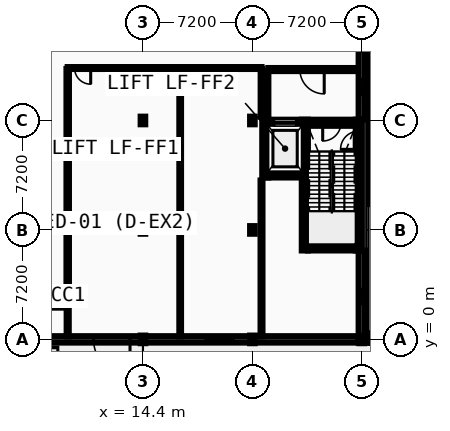
"""IFC4 building model, lengths in metres.
Left out: names, types, materials, properties, quantities, classifications, styles, units other than length and angle.
Written with IfcOpenShell. Run it as: python <this file> out.ifc"""

import sys

from ifc_helpers import new_model, si_unit, direction, frame, frame_2d, origin, origin_2d, place, context, subcontext, project, spatial, rectangle, i_section, extrude, element, fill, save


model = new_model("IFC4")
c1 = context("Model", 3, precision=1e-05, world=origin(), true_north=direction((0.0, 1.0)))
c2 = subcontext(c1, "Body", "Model", "MODEL_VIEW")
j1 = project(units=[si_unit("LENGTHUNIT", "METRE"), si_unit("PLANEANGLEUNIT", "RADIAN")], contexts=[c1])
p1 = place(None, origin())
s1 = spatial("IfcSite", under=j1, at=p1, CompositionType="ELEMENT")
p2 = place(p1, origin())
s2 = spatial("IfcBuilding", under=s1, at=p2, CompositionType="ELEMENT")
p3 = place(p2, origin())
s3 = spatial("IfcBuildingStorey", under=s2, at=p3, CompositionType="ELEMENT", Elevation=0.0)
for number, where, z_axis, x_axis in (
    (1, (14.4, 0.0, 0.0), (0.0, 0.0, 1.0), (1.0, 0.0, 0.0)),
    (2, (14.4, 7.2, 0.0), (0.0, 0.0, 1.0), (1.0, 0.0, 0.0)),
    (3, (14.4, 14.4, 0.0), (0.0, 0.0, 1.0), (1.0, 0.0, 0.0)),
    (4, (21.6, 0.0, 0.0), (0.0, 0.0, 1.0), (1.0, 0.0, 0.0)),
    (5, (21.6, 7.2, 0.0), (0.0, 0.0, 1.0), (1.0, 0.0, 0.0)),
    (6, (21.6, 14.4, 0.0), (0.0, 0.0, 1.0), (1.0, 0.0, 0.0)),
    (7, (28.8, 0.0, 0.0), (0.0, 0.0, 1.0), (1.0, 0.0, 0.0)),
):
    element("IfcColumn", number, at=place(p3, frame(where, z_axis=z_axis, x_axis=x_axis)), inside=s3, PredefinedType="COLUMN", context=c2, shape_type="SweptSolid", body=[
        extrude(i_section(OverallWidth=0.3, OverallDepth=0.5, WebThickness=0.014, FlangeThickness=0.028, FilletRadius=0.027, at=origin_2d()), origin(), (0.0, 0.0, 1.0), 5.2),
    ])
for number, where, z_axis, x_axis in (
    (8, (29.52, 0.0, 0.0), (0.0, 0.0, 1.0), (1.0, 0.0, 0.0)),
    (9, (29.52, 14.4, 0.0), (0.0, 0.0, 1.0), (1.0, 0.0, 0.0)),
):
    element("IfcColumn", number, at=place(p3, frame(where, z_axis=z_axis, x_axis=x_axis)), inside=s3, PredefinedType="COLUMN", context=c2, shape_type="SweptSolid", body=[
        extrude(i_section(OverallWidth=0.3, OverallDepth=0.45, WebThickness=0.014, FlangeThickness=0.026, FilletRadius=0.027, at=origin_2d()), origin(), (0.0, 0.0, 1.0), 5.2),
    ])
p4 = place(p3, frame((7.2, 0.0, 0.0), z_axis=(0.0, 0.0, 1.0), x_axis=(1.0, 0.0, 0.0)))
e10 = element("IfcWall", 10, at=p4, inside=s3, PredefinedType="STANDARD", context=c2, shape_type="SweptSolid", body=[
    extrude(rectangle(XDim=7.2, YDim=0.42, at=frame_2d((3.6, 0.0))), origin(), (0.0, 0.0, 1.0), 4.665),
])
p5 = place(p4, frame((3.95, 0.0, 0.0)))
e11 = element("IfcOpeningElement", 11, at=p5, cuts=e10, PredefinedType="OPENING", context=c2, shape_type="SweptSolid", body=[
    extrude(rectangle(XDim=2.4, YDim=2.5, at=frame_2d((1.2, 1.25))), frame((0.0, 0.22, 0.0), z_axis=(0.0, -1.0, 0.0), x_axis=(1.0, 0.0, 0.0)), (0.0, 0.0, 1.0), 0.44),
])
p6 = place(p3, frame((14.4, 0.0, 0.0), z_axis=(0.0, 0.0, 1.0), x_axis=(1.0, 0.0, 0.0)))
e12 = element("IfcWall", 12, at=p6, inside=s3, PredefinedType="STANDARD", context=c2, shape_type="SweptSolid", body=[
    extrude(rectangle(XDim=7.2, YDim=0.42, at=frame_2d((3.6, 0.0))), origin(), (0.0, 0.0, 1.0), 4.665),
])
p7 = place(p6, frame((4.14, 0.0, 0.9)))
e13 = element("IfcOpeningElement", 13, at=p7, cuts=e12, PredefinedType="OPENING", context=c2, shape_type="SweptSolid", body=[
    extrude(rectangle(XDim=1.8, YDim=1.8, at=frame_2d((0.9, 0.9))), frame((0.0, 0.22, 0.0), z_axis=(0.0, -1.0, 0.0), x_axis=(1.0, 0.0, 0.0)), (0.0, 0.0, 1.0), 0.44),
])
p8 = place(p3, frame((21.6, 0.0, 0.0), z_axis=(0.0, 0.0, 1.0), x_axis=(1.0, 0.0, 0.0)))
e14 = element("IfcWall", 14, at=p8, inside=s3, PredefinedType="STANDARD", context=c2, shape_type="SweptSolid", body=[
    extrude(rectangle(XDim=6.99, YDim=0.42, at=frame_2d((3.495, 0.0))), origin(), (0.0, 0.0, 1.0), 4.665),
])
p9 = place(p3, frame((28.8, -0.21, 0.0), z_axis=(0.0, 0.0, 1.0), x_axis=(0.0, 1.0, 0.0)))
e15 = element("IfcWall", 15, at=p9, inside=s3, PredefinedType="STANDARD", context=c2, shape_type="SweptSolid", body=[
    extrude(rectangle(XDim=6.06, YDim=0.42, at=frame_2d((3.03, 0.0))), origin(), (0.0, 0.0, 1.0), 4.97),
])
p10 = place(p9, frame((2.549, 0.0, 0.95)))
e16 = element("IfcOpeningElement", 16, at=p10, cuts=e15, PredefinedType="OPENING", context=c2, shape_type="SweptSolid", body=[
    extrude(rectangle(XDim=0.962, YDim=1.26, at=frame_2d((0.481, 0.63))), frame((0.0, 0.22, 0.0), z_axis=(0.0, -1.0, 0.0), x_axis=(1.0, 0.0, 0.0)), (0.0, 0.0, 1.0), 0.44),
])
p11 = place(p3, frame((28.8, 14.45, 0.0), z_axis=(0.0, 0.0, 1.0), x_axis=(0.0, 1.0, 0.0)))
e17 = element("IfcWall", 17, at=p11, inside=s3, PredefinedType="STANDARD", context=c2, shape_type="SweptSolid", body=[
    extrude(rectangle(XDim=7.15, YDim=0.42, at=frame_2d((3.575, 0.0))), origin(), (0.0, 0.0, 1.0), 4.97),
])
p12 = place(p11, frame((1.647, 0.0, 0.95)))
e18 = element("IfcOpeningElement", 18, at=p12, cuts=e17, PredefinedType="OPENING", context=c2, shape_type="SweptSolid", body=[
    extrude(rectangle(XDim=0.996, YDim=1.26, at=frame_2d((0.498, 0.63))), frame((0.0, 0.22, 0.0), z_axis=(0.0, -1.0, 0.0), x_axis=(1.0, 0.0, 0.0)), (0.0, 0.0, 1.0), 0.44),
])
p13 = place(p11, frame((4.507, 0.0, 0.95)))
e19 = element("IfcOpeningElement", 19, at=p13, cuts=e17, PredefinedType="OPENING", context=c2, shape_type="SweptSolid", body=[
    extrude(rectangle(XDim=0.996, YDim=1.26, at=frame_2d((0.498, 0.63))), frame((0.0, 0.22, 0.0), z_axis=(0.0, -1.0, 0.0), x_axis=(1.0, 0.0, 0.0)), (0.0, 0.0, 1.0), 0.44),
])
p14 = place(p3, frame((29.52, 0.4, 0.0), z_axis=(0.0, 0.0, 1.0), x_axis=(0.0, -1.0, 0.0)))
e20 = element("IfcWall", 20, at=p14, inside=s3, PredefinedType="STANDARD", context=c2, shape_type="SweptSolid", body=[
    extrude(rectangle(XDim=0.61, YDim=0.42, at=frame_2d((0.305, 0.0))), origin(), (0.0, 0.0, 1.0), 4.97),
])
p15 = place(p3, frame((29.52, 14.4, 0.0), z_axis=(0.0, 0.0, 1.0), x_axis=(0.0, -1.0, 0.0)))
e21 = element("IfcWall", 21, at=p15, inside=s3, PredefinedType="STANDARD", context=c2, shape_type="SweptSolid", body=[
    extrude(rectangle(XDim=5.5, YDim=0.42, at=frame_2d((2.75, 0.0))), origin(), (0.0, 0.0, 1.0), 4.97),
])
p16 = place(p3, frame((29.52, 21.6, 0.0), z_axis=(0.0, 0.0, 1.0), x_axis=(0.0, -1.0, 0.0)))
e22 = element("IfcWall", 22, at=p16, inside=s3, PredefinedType="STANDARD", context=c2, shape_type="SweptSolid", body=[
    extrude(rectangle(XDim=7.2, YDim=0.42, at=frame_2d((3.6, 0.0))), origin(), (0.0, 0.0, 1.0), 4.665),
])
p17 = place(p16, frame((1.628, 0.0, 0.95)))
e23 = element("IfcOpeningElement", 23, at=p17, cuts=e22, PredefinedType="OPENING", context=c2, shape_type="SweptSolid", body=[
    extrude(rectangle(XDim=1.064, YDim=1.296, at=frame_2d((0.532, 0.648))), frame((0.0, 0.22, 0.0), z_axis=(0.0, -1.0, 0.0), x_axis=(1.0, 0.0, 0.0)), (0.0, 0.0, 1.0), 0.44),
])
p18 = place(p16, frame((4.508, 0.0, 0.95)))
e24 = element("IfcOpeningElement", 24, at=p18, cuts=e22, PredefinedType="OPENING", context=c2, shape_type="SweptSolid", body=[
    extrude(rectangle(XDim=1.064, YDim=1.296, at=frame_2d((0.532, 0.648))), frame((0.0, 0.22, 0.0), z_axis=(0.0, -1.0, 0.0), x_axis=(1.0, 0.0, 0.0)), (0.0, 0.0, 1.0), 0.44),
])
p19 = place(p3, frame((25.25, 6.05, 0.0), z_axis=(0.0, 0.0, 1.0), x_axis=(1.0, 0.0, 0.0)))
e25 = element("IfcWall", 25, at=p19, inside=s3, PredefinedType="SHEAR", context=c2, shape_type="SweptSolid", body=[
    extrude(rectangle(XDim=3.15, YDim=0.4, at=frame_2d((1.575, 0.0))), origin(), (0.0, 0.0, 1.0), 4.97),
])
p20 = place(p3, frame((25.25, 14.25, 0.0), z_axis=(0.0, 0.0, 1.0), x_axis=(1.0, 0.0, 0.0)))
e26 = element("IfcWall", 26, at=p20, inside=s3, PredefinedType="SHEAR", context=c2, shape_type="SweptSolid", body=[
    extrude(rectangle(XDim=3.15, YDim=0.4, at=frame_2d((1.575, 0.0))), origin(), (0.0, 0.0, 1.0), 4.97),
])
p21 = place(p20, frame((0.975, 0.0, 0.0)))
e27 = element("IfcOpeningElement", 27, at=p21, cuts=e26, PredefinedType="OPENING", context=c2, shape_type="SweptSolid", body=[
    extrude(rectangle(XDim=1.2, YDim=2.15, at=frame_2d((0.6, 1.075))), frame((0.0, 0.21, 0.0), z_axis=(0.0, -1.0, 0.0), x_axis=(1.0, 0.0, 0.0)), (0.0, 0.0, 1.0), 0.42),
])
p22 = place(p3, frame((25.05, 5.85, 0.0), z_axis=(0.0, 0.0, 1.0), x_axis=(0.0, 1.0, 0.0)))
e28 = element("IfcWall", 28, at=p22, inside=s3, PredefinedType="SHEAR", context=c2, shape_type="SweptSolid", body=[
    extrude(rectangle(XDim=8.6, YDim=0.4, at=frame_2d((4.3, 0.0))), origin(), (0.0, 0.0, 1.0), 4.97),
])
p23 = place(p3, frame((28.6, 5.85, 0.0), z_axis=(0.0, 0.0, 1.0), x_axis=(0.0, 1.0, 0.0)))
e29 = element("IfcWall", 29, at=p23, inside=s3, PredefinedType="SHEAR", context=c2, shape_type="SweptSolid", body=[
    extrude(rectangle(XDim=8.6, YDim=0.4, at=frame_2d((4.3, 0.0))), origin(), (0.0, 0.0, 1.0), 4.97),
])
p24 = place(p23, frame((6.65, 0.0, 0.0)))
e30 = element("IfcOpeningElement", 30, at=p24, cuts=e29, PredefinedType="OPENING", context=c2, shape_type="SweptSolid", body=[
    extrude(rectangle(XDim=1.2, YDim=2.15, at=frame_2d((0.6, 1.075))), frame((0.0, 0.21, 0.0), z_axis=(0.0, -1.0, 0.0), x_axis=(1.0, 0.0, 0.0)), (0.0, 0.0, 1.0), 0.42),
])
p25 = place(p3, frame((22.65, 10.85, 0.0), z_axis=(0.0, 0.0, 1.0), x_axis=(1.0, 0.0, 0.0)))
e31 = element("IfcWall", 31, at=p25, inside=s3, PredefinedType="SHEAR", context=c2, shape_type="SweptSolid", body=[
    extrude(rectangle(XDim=2.2, YDim=0.4, at=frame_2d((1.1, 0.0))), origin(), (0.0, 0.0, 1.0), 4.97),
])
p26 = place(p3, frame((22.65, 14.25, 0.0), z_axis=(0.0, 0.0, 1.0), x_axis=(1.0, 0.0, 0.0)))
e32 = element("IfcWall", 32, at=p26, inside=s3, PredefinedType="SHEAR", context=c2, shape_type="SweptSolid", body=[
    extrude(rectangle(XDim=2.2, YDim=0.4, at=frame_2d((1.1, 0.0))), origin(), (0.0, 0.0, 1.0), 4.97),
])
p27 = place(p26, frame((0.4, 0.0, 0.0)))
e33 = element("IfcOpeningElement", 33, at=p27, cuts=e32, PredefinedType="OPENING", context=c2, shape_type="SweptSolid", body=[
    extrude(rectangle(XDim=1.4, YDim=2.2, at=frame_2d((0.7, 1.1))), frame((0.0, 0.21, 0.0), z_axis=(0.0, -1.0, 0.0), x_axis=(1.0, 0.0, 0.0)), (0.0, 0.0, 1.0), 0.42),
])
p28 = place(p3, frame((22.45, 10.65, 0.0), z_axis=(0.0, 0.0, 1.0), x_axis=(0.0, 1.0, 0.0)))
e34 = element("IfcWall", 34, at=p28, inside=s3, PredefinedType="SHEAR", context=c2, shape_type="SweptSolid", body=[
    extrude(rectangle(XDim=3.8, YDim=0.4, at=frame_2d((1.9, 0.0))), origin(), (0.0, 0.0, 1.0), 4.97),
])
p29 = place(p3, frame((22.65, 17.75, 0.0), z_axis=(0.0, 0.0, 1.0), x_axis=(1.0, 0.0, 0.0)))
e35 = element("IfcWall", 35, at=p29, inside=s3, PredefinedType="PARTITIONING", context=c2, shape_type="SweptSolid", body=[
    extrude(rectangle(XDim=5.75, YDim=0.2, at=frame_2d((2.875, 0.0))), origin(), (0.0, 0.0, 1.0), 4.97),
])
p30 = place(p29, frame((2.075, 0.0, 0.0)))
e36 = element("IfcOpeningElement", 36, at=p30, cuts=e35, PredefinedType="OPENING", context=c2, shape_type="SweptSolid", body=[
    extrude(rectangle(XDim=1.6, YDim=2.2, at=frame_2d((0.8, 1.1))), frame((0.0, 0.11, 0.0), z_axis=(0.0, -1.0, 0.0), x_axis=(1.0, 0.0, 0.0)), (0.0, 0.0, 1.0), 0.22),
])
p31 = place(p3, frame((22.55, 14.45, 0.0), z_axis=(0.0, 0.0, 1.0), x_axis=(0.0, 1.0, 0.0)))
e37 = element("IfcWall", 37, at=p31, inside=s3, PredefinedType="PARTITIONING", context=c2, shape_type="SweptSolid", body=[
    extrude(rectangle(XDim=3.2, YDim=0.2, at=frame_2d((1.6, 0.0))), origin(), (0.0, 0.0, 1.0), 4.97),
])
for number, where, z_axis, x_axis in (
    (38, (8.09, 2.145, 0.0), (0.0, 0.0, 1.0), (1.0, 0.0, 0.0)),
    (39, (8.09, 3.305, 0.0), (0.0, 0.0, 1.0), (1.0, 0.0, 0.0)),
):
    element("IfcWall", number, at=place(p3, frame(where, z_axis=z_axis, x_axis=x_axis)), inside=s3, PredefinedType="PARTITIONING", context=c2, shape_type="SweptSolid", body=[
        extrude(rectangle(XDim=1.27, YDim=0.11, at=frame_2d((0.635, 0.0))), origin(), (0.0, 0.0, 1.0), 4.97),
    ])
p32 = place(p3, frame((9.305, 2.2, 0.0), z_axis=(0.0, 0.0, 1.0), x_axis=(0.0, 1.0, 0.0)))
e40 = element("IfcWall", 40, at=p32, inside=s3, PredefinedType="PARTITIONING", context=c2, shape_type="SweptSolid", body=[
    extrude(rectangle(XDim=1.05, YDim=0.11, at=frame_2d((0.525, 0.0))), origin(), (0.0, 0.0, 1.0), 4.97),
])
p33 = place(p3, frame((9.45, 17.85, 0.0), z_axis=(0.0, 0.0, 1.0), x_axis=(1.0, 0.0, 0.0)))
e41 = element("IfcWall", 41, at=p33, inside=s3, PredefinedType="PARTITIONING", context=c2, shape_type="SweptSolid", body=[
    extrude(rectangle(XDim=12.75, YDim=0.125, at=frame_2d((6.375, 0.0))), origin(), (0.0, 0.0, 1.0), 4.97),
])
p34 = place(p33, frame((7.85, 0.0, 0.0)))
e42 = element("IfcOpeningElement", 42, at=p34, cuts=e41, PredefinedType="OPENING", context=c2, shape_type="SweptSolid", body=[
    extrude(rectangle(XDim=1.0, YDim=2.1, at=frame_2d((0.5, 1.05))), frame((0.0, 0.073, 0.0), z_axis=(0.0, -1.0, 0.0), x_axis=(1.0, 0.0, 0.0)), (0.0, 0.0, 1.0), 0.145),
])
p35 = place(p33, frame((0.45, 0.0, 0.0)))
e43 = element("IfcOpeningElement", 43, at=p35, cuts=e41, PredefinedType="OPENING", context=c2, shape_type="SweptSolid", body=[
    extrude(rectangle(XDim=1.062, YDim=2.068, at=frame_2d((0.531, 1.034))), frame((0.0, 0.073, 0.0), z_axis=(0.0, -1.0, 0.0), x_axis=(1.0, 0.0, 0.0)), (0.0, 0.0, 1.0), 0.145),
])
p36 = place(p3, frame((9.45, 0.2, 0.0), z_axis=(0.0, 0.0, 1.0), x_axis=(0.0, 1.0, 0.0)))
e44 = element("IfcWall", 44, at=p36, inside=s3, PredefinedType="PARTITIONING", context=c2, shape_type="SweptSolid", body=[
    extrude(rectangle(XDim=1.89, YDim=0.135, at=frame_2d((0.945, 0.0))), origin(), (0.0, 0.0, 1.0), 4.655),
])
p37 = place(p3, frame((9.45, 3.36, 0.0), z_axis=(0.0, 0.0, 1.0), x_axis=(0.0, 1.0, 0.0)))
e45 = element("IfcWall", 45, at=p37, inside=s3, PredefinedType="PARTITIONING", context=c2, shape_type="SweptSolid", body=[
    extrude(rectangle(XDim=14.427, YDim=0.16, at=frame_2d((7.214, 0.0))), origin(), (0.0, 0.0, 1.0), 4.655),
])
p38 = place(p3, frame((16.85, 0.2, 0.0), z_axis=(0.0, 0.0, 1.0), x_axis=(0.0, 1.0, 0.0)))
e46 = element("IfcWall", 46, at=p38, inside=s3, PredefinedType="PARTITIONING", context=c2, shape_type="SweptSolid", body=[
    extrude(rectangle(XDim=17.588, YDim=0.11, at=frame_2d((8.794, 0.0))), origin(), (0.0, 0.0, 1.0), 4.655),
])
p39 = place(p3, frame((22.2, 0.2, 0.0), z_axis=(0.0, 0.0, 1.0), x_axis=(0.0, 1.0, 0.0)))
e47 = element("IfcWall", 47, at=p39, inside=s3, PredefinedType="PARTITIONING", context=c2, shape_type="SweptSolid", body=[
    extrude(rectangle(XDim=10.25, YDim=0.125, at=frame_2d((5.125, 0.0))), origin(), (0.0, 0.0, 1.0), 4.97),
])
p40 = place(p3, frame((22.2, 14.65, 0.0), z_axis=(0.0, 0.0, 1.0), x_axis=(0.0, 1.0, 0.0)))
e48 = element("IfcWall", 48, at=p40, inside=s3, PredefinedType="PARTITIONING", context=c2, shape_type="SweptSolid", body=[
    extrude(rectangle(XDim=3.138, YDim=0.11, at=frame_2d((1.569, 0.0))), origin(), (0.0, 0.0, 1.0), 4.97),
])
p41 = place(p7, origin())
e49 = element("IfcWindow", 49, at=p41, inside=s3, PartitioningType="SINGLE_PANEL", PredefinedType="WINDOW", context=c2, shape_type="SweptSolid", body=[
    extrude(rectangle(XDim=1.8, YDim=1.8, at=frame_2d((0.9, 0.9))), frame((0.0, 0.03, 0.0), z_axis=(0.0, -1.0, 0.0), x_axis=(1.0, 0.0, 0.0)), (0.0, 0.0, 1.0), 0.06),
])
fill(e13, e49)
p42 = place(p10, origin())
e50 = element("IfcWindow", 50, at=p42, inside=s3, PartitioningType="SINGLE_PANEL", PredefinedType="WINDOW", context=c2, shape_type="SweptSolid", body=[
    extrude(rectangle(XDim=0.962, YDim=1.26, at=frame_2d((0.481, 0.63))), frame((0.0, 0.03, 0.0), z_axis=(0.0, -1.0, 0.0), x_axis=(1.0, 0.0, 0.0)), (0.0, 0.0, 1.0), 0.06),
])
fill(e16, e50)
p43 = place(p12, origin())
e51 = element("IfcWindow", 51, at=p43, inside=s3, PartitioningType="SINGLE_PANEL", PredefinedType="WINDOW", context=c2, shape_type="SweptSolid", body=[
    extrude(rectangle(XDim=0.996, YDim=1.26, at=frame_2d((0.498, 0.63))), frame((0.0, 0.03, 0.0), z_axis=(0.0, -1.0, 0.0), x_axis=(1.0, 0.0, 0.0)), (0.0, 0.0, 1.0), 0.06),
])
fill(e18, e51)
p44 = place(p5, origin())
e52 = element("IfcDoor", 52, at=p44, inside=s3, OperationType="DOUBLE_DOOR_SINGLE_SWING", PredefinedType="DOOR", context=c2, shape_type="SweptSolid", body=[
    extrude(rectangle(XDim=2.4, YDim=2.5, at=frame_2d((1.2, 1.25))), frame((0.0, 0.025, 0.0), z_axis=(0.0, -1.0, 0.0), x_axis=(1.0, 0.0, 0.0)), (0.0, 0.0, 1.0), 0.05),
])
fill(e11, e52)
p45 = place(p21, frame((1.2, 0.0, 0.0), z_axis=(0.0, 0.0, 1.0), x_axis=(-1.0, 0.0, 0.0)))
e53 = element("IfcDoor", 53, at=p45, inside=s3, OperationType="SINGLE_SWING_LEFT", PredefinedType="DOOR", context=c2, shape_type="SweptSolid", body=[
    extrude(rectangle(XDim=1.2, YDim=2.15, at=frame_2d((0.6, 1.075))), frame((0.0, 0.025, 0.0), z_axis=(0.0, -1.0, 0.0), x_axis=(1.0, 0.0, 0.0)), (0.0, 0.0, 1.0), 0.05),
])
fill(e27, e53)
p46 = place(p24, origin())
e54 = element("IfcDoor", 54, at=p46, inside=s3, OperationType="SINGLE_SWING_LEFT", PredefinedType="DOOR", context=c2, shape_type="SweptSolid", body=[
    extrude(rectangle(XDim=1.2, YDim=2.15, at=frame_2d((0.6, 1.075))), frame((0.0, 0.025, 0.0), z_axis=(0.0, -1.0, 0.0), x_axis=(1.0, 0.0, 0.0)), (0.0, 0.0, 1.0), 0.05),
])
fill(e30, e54)
p47 = place(p27, origin())
e55 = element("IfcDoor", 55, at=p47, inside=s3, OperationType="SLIDING_TO_LEFT", PredefinedType="DOOR", context=c2, shape_type="SweptSolid", body=[
    extrude(rectangle(XDim=1.4, YDim=2.2, at=frame_2d((0.7, 1.1))), frame((0.0, 0.025, 0.0), z_axis=(0.0, -1.0, 0.0), x_axis=(1.0, 0.0, 0.0)), (0.0, 0.0, 1.0), 0.05),
])
fill(e33, e55)
p48 = place(p30, origin())
e56 = element("IfcDoor", 56, at=p48, inside=s3, OperationType="DOUBLE_DOOR_SINGLE_SWING", PredefinedType="DOOR", context=c2, shape_type="SweptSolid", body=[
    extrude(rectangle(XDim=1.6, YDim=2.2, at=frame_2d((0.8, 1.1))), frame((0.0, 0.025, 0.0), z_axis=(0.0, -1.0, 0.0), x_axis=(1.0, 0.0, 0.0)), (0.0, 0.0, 1.0), 0.05),
])
fill(e36, e56)
p49 = place(p34, origin())
e57 = element("IfcDoor", 57, at=p49, inside=s3, OperationType="SLIDING_TO_LEFT", PredefinedType="DOOR", context=c2, shape_type="SweptSolid", body=[
    extrude(rectangle(XDim=1.0, YDim=2.1, at=frame_2d((0.5, 1.05))), frame((0.0, 0.025, 0.0), z_axis=(0.0, -1.0, 0.0), x_axis=(1.0, 0.0, 0.0)), (0.0, 0.0, 1.0), 0.05),
])
fill(e42, e57)
p50 = place(p35, origin())
e58 = element("IfcDoor", 58, at=p50, inside=s3, OperationType="SINGLE_SWING_RIGHT", PredefinedType="DOOR", context=c2, shape_type="SweptSolid", body=[
    extrude(rectangle(XDim=1.062, YDim=2.068, at=frame_2d((0.531, 1.034))), frame((0.0, 0.025, 0.0), z_axis=(0.0, -1.0, 0.0), x_axis=(1.0, 0.0, 0.0)), (0.0, 0.0, 1.0), 0.05),
])
fill(e43, e58)
save(model, sys.argv[1])
